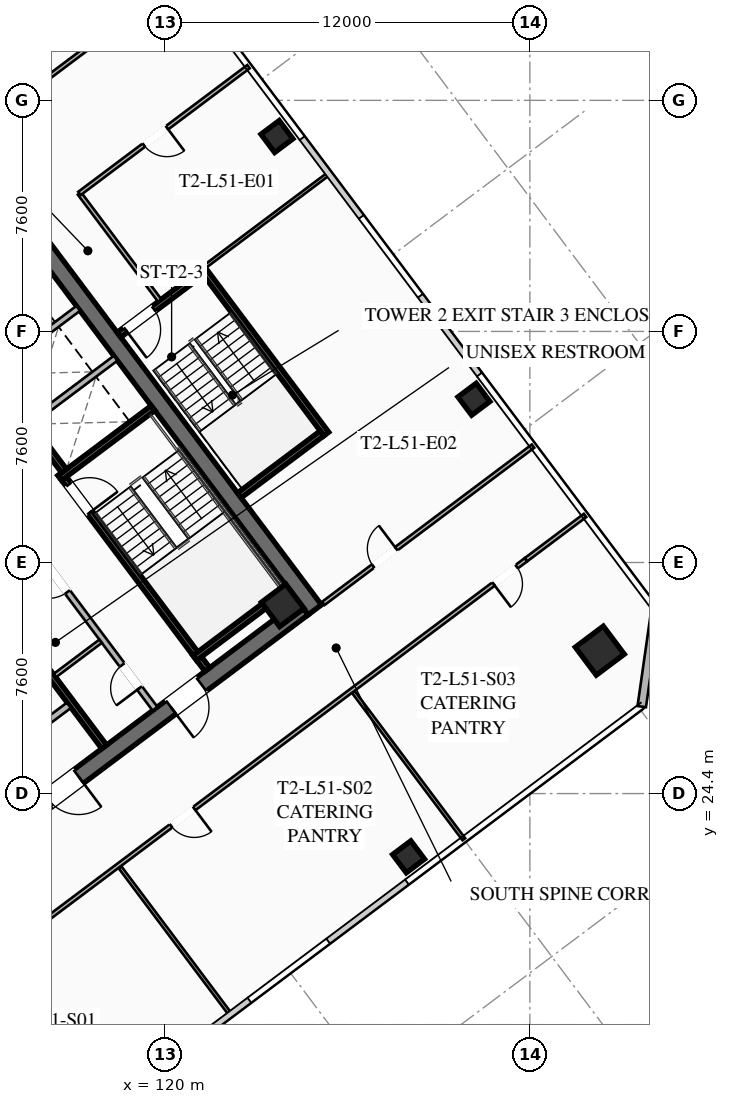
"""IFC4 building model, lengths in metres.
Left out: names, types, materials, properties, quantities, classifications, styles, units other than length and angle.
Written with IfcOpenShell. Run it as: python <this file> out.ifc"""

import sys

from ifc_helpers import new_model, si_unit, direction, frame, frame_2d, origin, origin_2d, place, context, subcontext, project, spatial, rectangle, hollow_rectangle, extrude, element, fill, save


model = new_model("IFC4")
c1 = context("Model", 3, precision=1e-05, world=origin(), true_north=direction((0.0, 1.0)))
c2 = subcontext(c1, "Body", "Model", "MODEL_VIEW")
j1 = project(units=[si_unit("LENGTHUNIT", "METRE"), si_unit("PLANEANGLEUNIT", "RADIAN")], contexts=[c1])
p1 = place(None, origin())
s1 = spatial("IfcSite", under=j1, at=p1, CompositionType="ELEMENT")
p2 = place(p1, origin())
s2 = spatial("IfcBuilding", under=s1, at=p2, CompositionType="ELEMENT")
p3 = place(p2, frame((0.0, 0.0, 188.95)))
s3 = spatial("IfcBuildingStorey", under=s2, at=p3, CompositionType="ELEMENT", Elevation=188.95)
p4 = place(p3, frame((115.564, 42.923, 0.0), z_axis=(0.0, 0.0, 1.0), x_axis=(0.600005007985, -0.799996243986, 0.0)))
e1 = element("IfcWall", 1, at=p4, inside=s3, PredefinedType="SHEAR", context=c2, shape_type="SweptSolid", body=[
    extrude(rectangle(XDim=15.6, YDim=0.55, at=frame_2d((7.8, 0.0))), origin(), (0.0, 0.0, 1.0), 3.55),
])
p5 = place(p3, frame((124.539, 30.498, 0.0), z_axis=(0.0, 0.0, 1.0), x_axis=(-0.799998054672, -0.600002593761, 0.0)))
e2 = element("IfcWall", 2, at=p5, inside=s3, PredefinedType="SHEAR", context=c2, shape_type="SweptSolid", body=[
    extrude(rectangle(XDim=15.06, YDim=0.55, at=frame_2d((7.53, 0.0))), origin(), (0.0, 0.0, 1.0), 3.55),
])
p6 = place(p5, frame((9.23, 0.0, 0.0)))
e3 = element("IfcOpeningElement", 3, at=p6, cuts=e2, PredefinedType="OPENING", context=c2, shape_type="SweptSolid", body=[
    extrude(rectangle(XDim=1.25, YDim=2.25, at=frame_2d((0.625, 1.125))), frame((0.0, 0.285, 0.0), z_axis=(0.0, -1.0, 0.0), x_axis=(1.0, 0.0, 0.0)), (0.0, 0.0, 1.0), 0.57),
])
p7 = place(p5, frame((4.18, 0.0, 0.0)))
e4 = element("IfcOpeningElement", 4, at=p7, cuts=e2, PredefinedType="OPENING", context=c2, shape_type="SweptSolid", body=[
    extrude(rectangle(XDim=1.25, YDim=2.25, at=frame_2d((0.625, 1.125))), frame((0.0, 0.285, 0.0), z_axis=(0.0, -1.0, 0.0), x_axis=(1.0, 0.0, 0.0)), (0.0, 0.0, 1.0), 0.57),
])
p8 = place(p3, frame((123.87, 30.59, 0.0), z_axis=(0.0, 0.0, 1.0), x_axis=(0.799999996291, 0.600000004945, 0.0)))
e5 = element("IfcColumn", 5, at=p8, inside=s3, PredefinedType="COLUMN", context=c2, shape_type="SweptSolid", body=[
    extrude(hollow_rectangle(XDim=1.0, YDim=1.0, WallThickness=0.04, at=origin_2d()), origin(), (0.0, 0.0, 1.0), 3.37),
])
p9 = place(p3, frame((134.3, 29.1, 0.0), z_axis=(0.0, 0.0, 1.0), x_axis=(0.799999996291, 0.600000004945, 0.0)))
e6 = element("IfcColumn", 6, at=p9, inside=s3, PredefinedType="COLUMN", context=c2, shape_type="SweptSolid", body=[
    extrude(hollow_rectangle(XDim=1.15, YDim=1.15, WallThickness=0.045, at=origin_2d()), origin(), (0.0, 0.0, 1.0), 3.37),
])
for number, where, z_axis, x_axis in (
    (7, (128.01, 22.32, 0.0), (0.0, 0.0, 1.0), (0.8, 0.6, 0.0)),
    (8, (130.16, 37.37, 0.0), (0.0, 0.0, 1.0), (0.8, 0.6, 0.0)),
    (9, (123.68, 46.01, 0.0), (0.0, 0.0, 1.0), (0.8, 0.6, 0.0)),
):
    element("IfcColumn", number, at=place(p3, frame(where, z_axis=z_axis, x_axis=x_axis)), inside=s3, PredefinedType="COLUMN", context=c2, shape_type="SweptSolid", body=[
        extrude(hollow_rectangle(XDim=0.75, YDim=0.75, WallThickness=0.032, at=origin_2d()), origin(), (0.0, 0.0, 1.0), 3.37),
    ])
p10 = place(p3, frame((136.14, 30.48, 0.0), z_axis=(0.0, 0.0, 1.0), x_axis=(-0.141410847992, -0.989950994782, 0.0)))
e10 = element("IfcWall", 10, at=p10, inside=s3, PredefinedType="SOLIDWALL", context=c2, shape_type="SweptSolid", body=[
    extrude(rectangle(XDim=3.253, YDim=0.28, at=frame_2d((1.626, 0.0))), origin(), (0.0, 0.0, 1.0), 3.37),
])
p11 = place(p3, frame((116.56, 34.92, 0.0), z_axis=(0.0, 0.0, 1.0), x_axis=(0.59999029481, -0.8000072788, 0.0)))
e11 = element("IfcWall", 11, at=p11, inside=s3, PredefinedType="SHEAR", context=c2, shape_type="SweptSolid", body=[
    extrude(rectangle(XDim=8.05, YDim=0.2, at=frame_2d((4.025, 0.0))), origin(), (0.0, 0.0, 1.0), 3.37),
])
p12 = place(p11, frame((0.45, 0.0, 0.0)))
e12 = element("IfcOpeningElement", 12, at=p12, cuts=e11, PredefinedType="OPENING", context=c2, shape_type="SweptSolid", body=[
    extrude(rectangle(XDim=1.15, YDim=2.2, at=frame_2d((0.575, 1.1))), frame((0.0, 0.11, 0.0), z_axis=(0.0, -1.0, 0.0), x_axis=(1.0, 0.0, 0.0)), (0.0, 0.0, 1.0), 0.22),
])
for number, where, z_axis, x_axis in (
    (13, (116.54, 34.78, 0.0), (0.0, 0.0, 1.0), (0.8, 0.6, 0.0)),
    (14, (120.98, 28.86, 0.0), (0.0, 0.0, 1.0), (0.8, 0.6, 0.0)),
):
    element("IfcWall", number, at=place(p3, frame(where, z_axis=z_axis, x_axis=x_axis)), inside=s3, PredefinedType="SHEAR", context=c2, shape_type="SweptSolid", body=[
        extrude(rectangle(XDim=3.83, YDim=0.2, at=frame_2d((1.915, 0.0))), origin(), (0.0, 0.0, 1.0), 3.37),
    ])
p13 = place(p3, frame((117.998, 25.936, 0.0), z_axis=(0.0, 0.0, 1.0), x_axis=(-0.600002693989, 0.799997979501, 0.0)))
e15 = element("IfcWall", 15, at=p13, inside=s3, PredefinedType="SHEAR", context=c2, shape_type="SweptSolid", body=[
    extrude(rectangle(XDim=14.5, YDim=0.2, at=frame_2d((7.25, 0.0))), origin(), (0.0, 0.0, 1.0), 3.37),
])
p14 = place(p3, frame((114.316, 25.412, 0.0), z_axis=(0.0, 0.0, 1.0), x_axis=(0.800018601094, 0.59997519774, 0.0)))
e16 = element("IfcWall", 16, at=p14, inside=s3, PredefinedType="SOLIDWALL", context=c2, shape_type="SweptSolid", body=[
    extrude(rectangle(XDim=3.15, YDim=0.22, at=frame_2d((1.575, 0.0))), origin(), (0.0, 0.0, 1.0), 2.723),
])
p15 = place(p14, frame((0.95, 0.0, 0.0)))
e17 = element("IfcOpeningElement", 17, at=p15, cuts=e16, PredefinedType="OPENING", context=c2, shape_type="SweptSolid", body=[
    extrude(rectangle(XDim=1.25, YDim=2.25, at=frame_2d((0.625, 1.125))), frame((0.0, 0.12, 0.0), z_axis=(0.0, -1.0, 0.0), x_axis=(1.0, 0.0, 0.0)), (0.0, 0.0, 1.0), 0.24),
])
p16 = place(p3, frame((112.81, 40.17, 0.0), z_axis=(0.0, 0.0, 1.0), x_axis=(0.599993943644, -0.800004542231, 0.0)))
e18 = element("IfcWall", 18, at=p16, inside=s3, PredefinedType="SHEAR", context=c2, shape_type="SweptSolid", body=[
    extrude(rectangle(XDim=6.45, YDim=0.2, at=frame_2d((3.225, 0.0))), origin(), (0.0, 0.0, 1.0), 3.37),
])
for number, where, z_axis, x_axis in (
    (19, (115.59, 36.63, 0.0), (0.0, 0.0, 1.0), (0.8, 0.6, 0.0)),
    (20, (114.36, 38.27, 0.0), (0.0, 0.0, 1.0), (0.8, 0.6, 0.0)),
):
    element("IfcWall", number, at=place(p3, frame(where, z_axis=z_axis, x_axis=x_axis)), inside=s3, PredefinedType="SOLIDWALL", context=c2, shape_type="SweptSolid", body=[
        extrude(rectangle(XDim=3.48, YDim=0.2, at=frame_2d((1.74, 0.0))), origin(), (0.0, 0.0, 1.0), 3.37),
    ])
p17 = place(p3, frame((119.67, 27.19, 0.0), z_axis=(0.0, 0.0, 1.0), x_axis=(-0.599988677396, 0.800008491828, 0.0)))
e21 = element("IfcWall", 21, at=p17, inside=s3, PredefinedType="SOLIDWALL", context=c2, shape_type="SweptSolid", body=[
    extrude(rectangle(XDim=6.9, YDim=0.2, at=frame_2d((3.45, 0.0))), origin(), (0.0, 0.0, 1.0), 2.723),
])
p18 = place(p17, frame((0.85, 0.0, 0.0)))
e22 = element("IfcOpeningElement", 22, at=p18, cuts=e21, PredefinedType="OPENING", context=c2, shape_type="SweptSolid", body=[
    extrude(rectangle(XDim=0.95, YDim=2.05, at=frame_2d((0.475, 1.025))), frame((0.0, 0.11, 0.0), z_axis=(0.0, -1.0, 0.0), x_axis=(1.0, 0.0, 0.0)), (0.0, 0.0, 1.0), 0.22),
])
p19 = place(p17, frame((4.8, 0.0, 0.0)))
e23 = element("IfcOpeningElement", 23, at=p19, cuts=e21, PredefinedType="OPENING", context=c2, shape_type="SweptSolid", body=[
    extrude(rectangle(XDim=1.05, YDim=2.2, at=frame_2d((0.525, 1.1))), frame((0.0, 0.11, 0.0), z_axis=(0.0, -1.0, 0.0), x_axis=(1.0, 0.0, 0.0)), (0.0, 0.0, 1.0), 0.22),
])
p20 = place(p3, frame((116.376, 28.282, 0.0), z_axis=(0.0, 0.0, 1.0), x_axis=(0.8, 0.6, 0.0)))
e24 = element("IfcWall", 24, at=p20, inside=s3, PredefinedType="PARTITIONING", context=c2, shape_type="SweptSolid", body=[
    extrude(rectangle(XDim=1.88, YDim=0.135, at=frame_2d((0.94, 0.0))), origin(), (0.0, 0.0, 1.0), 2.723),
])
p21 = place(p3, frame((125.304, 36.228, 0.0), z_axis=(0.0, 0.0, 1.0), x_axis=(-0.59998851072, 0.800008616831, 0.0)))
e25 = element("IfcWall", 25, at=p21, inside=s3, PredefinedType="SHEAR", context=c2, shape_type="SweptSolid", body=[
    extrude(rectangle(XDim=6.8, YDim=0.2, at=frame_2d((3.4, 0.0))), origin(), (0.0, 0.0, 1.0), 3.37),
])
p22 = place(p3, frame((121.204, 41.528, 0.0), z_axis=(0.0, 0.0, 1.0), x_axis=(-0.800017232136, -0.599977023131, 0.0)))
e26 = element("IfcWall", 26, at=p22, inside=s3, PredefinedType="SHEAR", context=c2, shape_type="SweptSolid", body=[
    extrude(rectangle(XDim=3.4, YDim=0.2, at=frame_2d((1.7, 0.0))), origin(), (0.0, 0.0, 1.0), 3.37),
])
p23 = place(p22, frame((1.975, 0.0, 0.0)))
e27 = element("IfcOpeningElement", 27, at=p23, cuts=e26, PredefinedType="OPENING", context=c2, shape_type="SweptSolid", body=[
    extrude(rectangle(XDim=1.15, YDim=2.2, at=frame_2d((0.575, 1.1))), frame((0.0, 0.11, 0.0), z_axis=(0.0, -1.0, 0.0), x_axis=(1.0, 0.0, 0.0)), (0.0, 0.0, 1.0), 0.22),
])
p24 = place(p3, frame((122.444, 34.208, 0.0), z_axis=(0.0, 0.0, 1.0), x_axis=(0.79999138319, 0.600011488909, 0.0)))
e28 = element("IfcWall", 28, at=p24, inside=s3, PredefinedType="SHEAR", context=c2, shape_type="SweptSolid", body=[
    extrude(rectangle(XDim=3.4, YDim=0.2, at=frame_2d((1.7, 0.0))), origin(), (0.0, 0.0, 1.0), 3.37),
])
p25 = place(p3, frame((119.824, 40.618, 0.0), z_axis=(0.0, 0.0, 1.0), x_axis=(-0.599982243973, 0.800013316712, 0.0)))
e29 = element("IfcWall", 29, at=p25, inside=s3, PredefinedType="PARTITIONING", context=c2, shape_type="SweptSolid", body=[
    extrude(rectangle(XDim=4.4, YDim=0.135, at=frame_2d((2.2, 0.0))), origin(), (0.0, 0.0, 1.0), 2.723),
])
p26 = place(p3, frame((95.638, 32.566, 0.0), z_axis=(0.0, 0.0, 1.0), x_axis=(0.8, 0.6, 0.0)))
e30 = element("IfcWall", 30, at=p26, inside=s3, PredefinedType="PARTITIONING", context=c2, shape_type="SweptSolid", body=[
    extrude(rectangle(XDim=28.7, YDim=0.135, at=frame_2d((14.35, 0.0))), origin(), (0.0, 0.0, 1.0), 2.723),
])
p27 = place(p26, frame((0.3, 0.0, 0.0)))
e31 = element("IfcOpeningElement", 31, at=p27, cuts=e30, PredefinedType="OPENING", context=c2, shape_type="SweptSolid", body=[
    extrude(rectangle(XDim=0.95, YDim=2.05, at=frame_2d((0.475, 1.025))), frame((0.0, 0.077, 0.0), z_axis=(0.0, -1.0, 0.0), x_axis=(1.0, 0.0, 0.0)), (0.0, 0.0, 1.0), 0.155),
])
p28 = place(p26, frame((14.083, 0.0, 0.0)))
e32 = element("IfcOpeningElement", 32, at=p28, cuts=e30, PredefinedType="OPENING", context=c2, shape_type="SweptSolid", body=[
    extrude(rectangle(XDim=0.95, YDim=2.05, at=frame_2d((0.475, 1.025))), frame((0.0, 0.077, 0.0), z_axis=(0.0, -1.0, 0.0), x_axis=(1.0, 0.0, 0.0)), (0.0, 0.0, 1.0), 0.155),
])
p29 = place(p26, frame((27.45, 0.0, 0.0)))
e33 = element("IfcOpeningElement", 33, at=p29, cuts=e30, PredefinedType="OPENING", context=c2, shape_type="SweptSolid", body=[
    extrude(rectangle(XDim=0.95, YDim=2.05, at=frame_2d((0.475, 1.025))), frame((0.0, 0.077, 0.0), z_axis=(0.0, -1.0, 0.0), x_axis=(1.0, 0.0, 0.0)), (0.0, 0.0, 1.0), 0.155),
])
p30 = place(p3, frame((131.87, 32.09, 0.0), z_axis=(0.0, 0.0, 1.0), x_axis=(-0.800003062365, -0.599995916825, 0.0)))
e34 = element("IfcWall", 34, at=p30, inside=s3, PredefinedType="PARTITIONING", context=c2, shape_type="SweptSolid", body=[
    extrude(rectangle(XDim=28.7, YDim=0.135, at=frame_2d((14.35, 0.0))), origin(), (0.0, 0.0, 1.0), 2.723),
])
p31 = place(p30, frame((27.37, 0.0, 0.0)))
e35 = element("IfcOpeningElement", 35, at=p31, cuts=e34, PredefinedType="OPENING", context=c2, shape_type="SweptSolid", body=[
    extrude(rectangle(XDim=0.95, YDim=2.05, at=frame_2d((0.475, 1.025))), frame((0.0, 0.077, 0.0), z_axis=(0.0, -1.0, 0.0), x_axis=(1.0, 0.0, 0.0)), (0.0, 0.0, 1.0), 0.155),
])
p32 = place(p30, frame((13.638, 0.0, 0.0)))
e36 = element("IfcOpeningElement", 36, at=p32, cuts=e34, PredefinedType="OPENING", context=c2, shape_type="SweptSolid", body=[
    extrude(rectangle(XDim=0.95, YDim=2.05, at=frame_2d((0.475, 1.025))), frame((0.0, 0.077, 0.0), z_axis=(0.0, -1.0, 0.0), x_axis=(1.0, 0.0, 0.0)), (0.0, 0.0, 1.0), 0.155),
])
p33 = place(p30, frame((0.38, 0.0, 0.0)))
e37 = element("IfcOpeningElement", 37, at=p33, cuts=e34, PredefinedType="OPENING", context=c2, shape_type="SweptSolid", body=[
    extrude(rectangle(XDim=0.95, YDim=2.05, at=frame_2d((0.475, 1.025))), frame((0.0, 0.077, 0.0), z_axis=(0.0, -1.0, 0.0), x_axis=(1.0, 0.0, 0.0)), (0.0, 0.0, 1.0), 0.155),
])
p34 = place(p3, frame((131.87, 32.09, 0.0), z_axis=(0.0, 0.0, 1.0), x_axis=(0.799975885537, 0.600032151272, 0.0)))
e38 = element("IfcWall", 38, at=p34, inside=s3, PredefinedType="PARTITIONING", context=c2, shape_type="SweptSolid", body=[
    extrude(rectangle(XDim=2.43, YDim=0.135, at=frame_2d((1.215, 0.0))), origin(), (0.0, 0.0, 1.0), 2.723),
])
for number, where, z_axis, x_axis in (
    (39, (122.148, 17.136, 0.0), (0.0, 0.0, 1.0), (-0.6, 0.8, 0.0)),
    (40, (129.828, 22.896, 0.0), (0.0, 0.0, 1.0), (-0.6, 0.8, 0.0)),
):
    element("IfcWall", number, at=place(p3, frame(where, z_axis=z_axis, x_axis=x_axis)), inside=s3, PredefinedType="PARTITIONING", context=c2, shape_type="SweptSolid", body=[
        extrude(rectangle(XDim=6.05, YDim=0.11, at=frame_2d((3.025, 0.0))), origin(), (0.0, 0.0, 1.0), 2.723),
    ])
p35 = place(p3, frame((122.744, 48.308, 0.0), z_axis=(0.0, 0.0, 1.0), x_axis=(-0.79997892247, -0.600028102345, 0.0)))
e41 = element("IfcWall", 41, at=p35, inside=s3, PredefinedType="PARTITIONING", context=c2, shape_type="SweptSolid", body=[
    extrude(rectangle(XDim=6.95, YDim=0.135, at=frame_2d((3.475, 0.0))), origin(), (0.0, 0.0, 1.0), 2.723),
])
p36 = place(p35, frame((3.35, 0.0, 0.0)))
e42 = element("IfcOpeningElement", 42, at=p36, cuts=e41, PredefinedType="OPENING", context=c2, shape_type="SweptSolid", body=[
    extrude(rectangle(XDim=0.95, YDim=2.05, at=frame_2d((0.475, 1.025))), frame((0.0, 0.077, 0.0), z_axis=(0.0, -1.0, 0.0), x_axis=(1.0, 0.0, 0.0)), (0.0, 0.0, 1.0), 0.155),
])
p37 = place(p3, frame((125.208, 30.656, 0.0), z_axis=(0.0, 0.0, 1.0), x_axis=(0.800006797429, 0.599990936654, 0.0)))
e43 = element("IfcWall", 43, at=p37, inside=s3, PredefinedType="PARTITIONING", context=c2, shape_type="SweptSolid", body=[
    extrude(rectangle(XDim=8.62, YDim=0.135, at=frame_2d((4.31, 0.0))), origin(), (0.0, 0.0, 1.0), 2.723),
])
p38 = place(p37, frame((2.045, 0.0, 0.0)))
e44 = element("IfcOpeningElement", 44, at=p38, cuts=e43, PredefinedType="OPENING", context=c2, shape_type="SweptSolid", body=[
    extrude(rectangle(XDim=0.95, YDim=2.05, at=frame_2d((0.475, 1.025))), frame((0.0, 0.077, 0.0), z_axis=(0.0, -1.0, 0.0), x_axis=(1.0, 0.0, 0.0)), (0.0, 0.0, 1.0), 0.155),
])
p39 = place(p3, frame((125.384, 44.788, 0.0), z_axis=(0.0, 0.0, 1.0), x_axis=(-0.8, -0.6, 0.0)))
e45 = element("IfcWall", 45, at=p39, inside=s3, PredefinedType="PARTITIONING", context=c2, shape_type="SweptSolid", body=[
    extrude(rectangle(XDim=5.1, YDim=0.11, at=frame_2d((2.55, 0.0))), origin(), (0.0, 0.0, 1.0), 2.723),
])
p40 = place(p6, origin())
e46 = element("IfcDoor", 46, at=p40, inside=s3, OperationType="SINGLE_SWING_LEFT", PredefinedType="DOOR", context=c2, shape_type="SweptSolid", body=[
    extrude(rectangle(XDim=1.25, YDim=2.25, at=frame_2d((0.625, 1.125))), frame((0.0, 0.025, 0.0), z_axis=(0.0, -1.0, 0.0), x_axis=(1.0, 0.0, 0.0)), (0.0, 0.0, 1.0), 0.05),
])
fill(e3, e46)
p41 = place(p7, origin())
e47 = element("IfcDoor", 47, at=p41, inside=s3, OperationType="SINGLE_SWING_RIGHT", PredefinedType="DOOR", context=c2, shape_type="SweptSolid", body=[
    extrude(rectangle(XDim=1.25, YDim=2.25, at=frame_2d((0.625, 1.125))), frame((0.0, 0.025, 0.0), z_axis=(0.0, -1.0, 0.0), x_axis=(1.0, 0.0, 0.0)), (0.0, 0.0, 1.0), 0.05),
])
fill(e4, e47)
p42 = place(p12, origin())
e48 = element("IfcDoor", 48, at=p42, inside=s3, OperationType="SINGLE_SWING_RIGHT", PredefinedType="DOOR", context=c2, shape_type="SweptSolid", body=[
    extrude(rectangle(XDim=1.15, YDim=2.2, at=frame_2d((0.575, 1.1))), frame((0.0, 0.025, 0.0), z_axis=(0.0, -1.0, 0.0), x_axis=(1.0, 0.0, 0.0)), (0.0, 0.0, 1.0), 0.05),
])
fill(e12, e48)
p43 = place(p18, origin())
e49 = element("IfcDoor", 49, at=p43, inside=s3, OperationType="SINGLE_SWING_LEFT", PredefinedType="DOOR", context=c2, shape_type="SweptSolid", body=[
    extrude(rectangle(XDim=0.95, YDim=2.05, at=frame_2d((0.475, 1.025))), frame((0.0, 0.025, 0.0), z_axis=(0.0, -1.0, 0.0), x_axis=(1.0, 0.0, 0.0)), (0.0, 0.0, 1.0), 0.05),
])
fill(e22, e49)
p44 = place(p19, origin())
e50 = element("IfcDoor", 50, at=p44, inside=s3, OperationType="SINGLE_SWING_RIGHT", PredefinedType="DOOR", context=c2, shape_type="SweptSolid", body=[
    extrude(rectangle(XDim=1.05, YDim=2.2, at=frame_2d((0.525, 1.1))), frame((0.0, 0.025, 0.0), z_axis=(0.0, -1.0, 0.0), x_axis=(1.0, 0.0, 0.0)), (0.0, 0.0, 1.0), 0.05),
])
fill(e23, e50)
p45 = place(p23, origin())
e51 = element("IfcDoor", 51, at=p45, inside=s3, OperationType="SINGLE_SWING_RIGHT", PredefinedType="DOOR", context=c2, shape_type="SweptSolid", body=[
    extrude(rectangle(XDim=1.15, YDim=2.2, at=frame_2d((0.575, 1.1))), frame((0.0, 0.025, 0.0), z_axis=(0.0, -1.0, 0.0), x_axis=(1.0, 0.0, 0.0)), (0.0, 0.0, 1.0), 0.05),
])
fill(e27, e51)
p46 = place(p32, origin())
e52 = element("IfcDoor", 52, at=p46, inside=s3, OperationType="SINGLE_SWING_LEFT", PredefinedType="DOOR", context=c2, shape_type="SweptSolid", body=[
    extrude(rectangle(XDim=0.95, YDim=2.05, at=frame_2d((0.475, 1.025))), frame((0.0, 0.025, 0.0), z_axis=(0.0, -1.0, 0.0), x_axis=(1.0, 0.0, 0.0)), (0.0, 0.0, 1.0), 0.05),
])
fill(e36, e52)
p47 = place(p33, origin())
e53 = element("IfcDoor", 53, at=p47, inside=s3, OperationType="SINGLE_SWING_RIGHT", PredefinedType="DOOR", context=c2, shape_type="SweptSolid", body=[
    extrude(rectangle(XDim=0.95, YDim=2.05, at=frame_2d((0.475, 1.025))), frame((0.0, 0.025, 0.0), z_axis=(0.0, -1.0, 0.0), x_axis=(1.0, 0.0, 0.0)), (0.0, 0.0, 1.0), 0.05),
])
fill(e37, e53)
p48 = place(p36, origin())
e54 = element("IfcDoor", 54, at=p48, inside=s3, OperationType="SINGLE_SWING_LEFT", PredefinedType="DOOR", context=c2, shape_type="SweptSolid", body=[
    extrude(rectangle(XDim=0.95, YDim=2.05, at=frame_2d((0.475, 1.025))), frame((0.0, 0.025, 0.0), z_axis=(0.0, -1.0, 0.0), x_axis=(1.0, 0.0, 0.0)), (0.0, 0.0, 1.0), 0.05),
])
fill(e42, e54)
p49 = place(p38, origin())
e55 = element("IfcDoor", 55, at=p49, inside=s3, OperationType="SINGLE_SWING_RIGHT", PredefinedType="DOOR", context=c2, shape_type="SweptSolid", body=[
    extrude(rectangle(XDim=0.95, YDim=2.05, at=frame_2d((0.475, 1.025))), frame((0.0, 0.025, 0.0), z_axis=(0.0, -1.0, 0.0), x_axis=(1.0, 0.0, 0.0)), (0.0, 0.0, 1.0), 0.05),
])
fill(e44, e55)
save(model, sys.argv[1])
